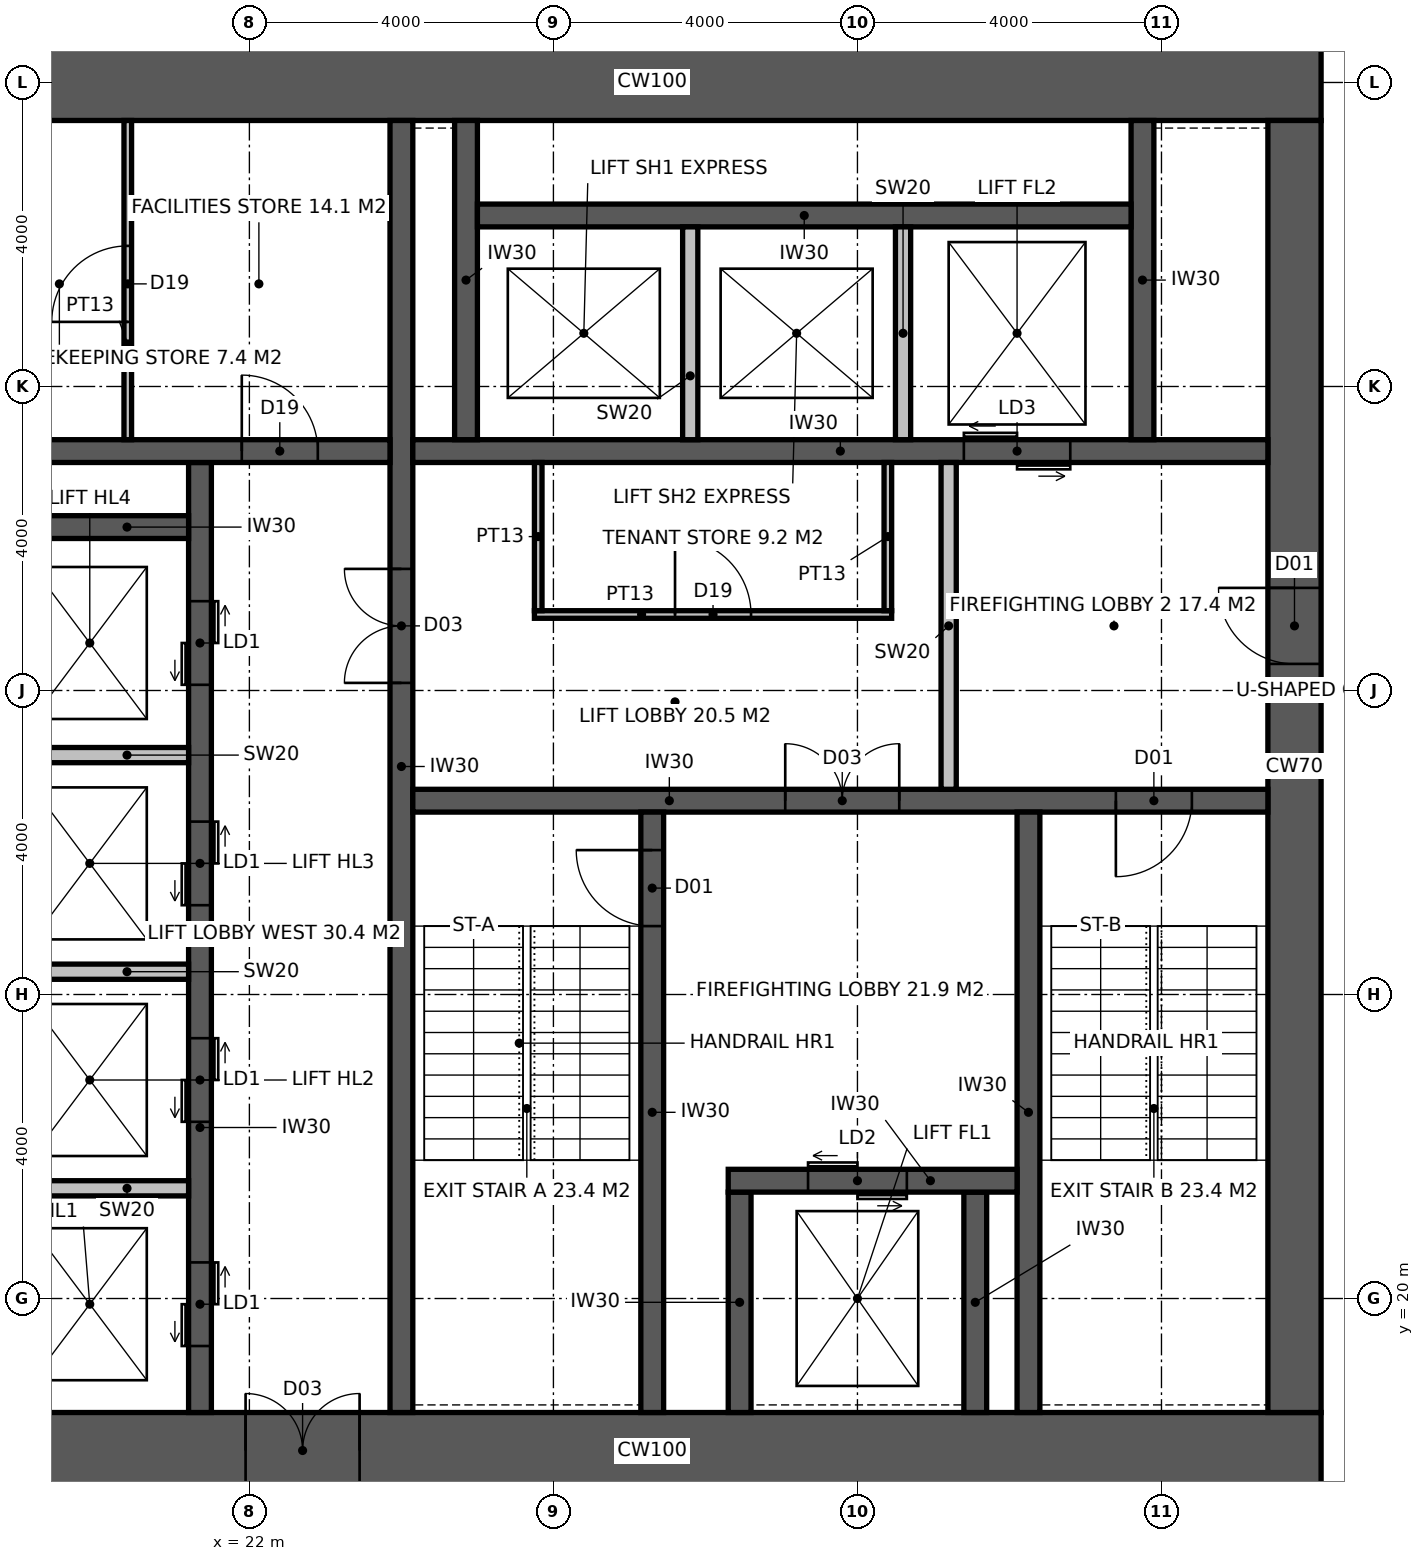
"""IFC4 building model, lengths in metres.
Left out: names, types, materials, properties, quantities, classifications, styles, units other than length and angle.
Written with IfcOpenShell. Run it as: python <this file> out.ifc"""

import sys

from ifc_helpers import new_model, si_unit, direction, frame, frame_2d, origin, place, context, subcontext, project, spatial, rectangle, extrude, element, fill, save


model = new_model("IFC4")
c1 = context("Model", 3, precision=1e-05, world=origin(), true_north=direction((0.0, 1.0)))
c2 = subcontext(c1, "Body", "Model", "MODEL_VIEW")
j1 = project(units=[si_unit("LENGTHUNIT", "METRE"), si_unit("PLANEANGLEUNIT", "RADIAN")], contexts=[c1])
p1 = place(None, origin())
s1 = spatial("IfcSite", under=j1, at=p1, CompositionType="ELEMENT")
p2 = place(p1, origin())
s2 = spatial("IfcBuilding", under=s1, at=p2, CompositionType="ELEMENT")
p3 = place(p2, frame((0.0, 0.0, 187.8)))
s3 = spatial("IfcBuildingStorey", under=s2, at=p3, CompositionType="ELEMENT", Elevation=187.8)
p4 = place(p3, frame((18.5, 18.0, -0.15), z_axis=(0.0, 0.0, 1.0), x_axis=(1.0, 0.0, 0.0)))
e1 = element("IfcWall", 1, at=p4, inside=s3, PredefinedType="SHEAR", context=c2, shape_type="SweptSolid", body=[
    extrude(rectangle(XDim=17.6, YDim=1.0, at=frame_2d((8.8, 0.0))), origin(), (0.0, 0.0, 1.0), 4.0),
])
p5 = place(p4, frame((3.45, 0.0, 0.15)))
e2 = element("IfcOpeningElement", 2, at=p5, cuts=e1, PredefinedType="OPENING", context=c2, shape_type="SweptSolid", body=[
    extrude(rectangle(XDim=1.5, YDim=2.4, at=frame_2d((0.75, 1.2))), frame((0.0, 0.51, 0.0), z_axis=(0.0, -1.0, 0.0), x_axis=(1.0, 0.0, 0.0)), (0.0, 0.0, 1.0), 1.02),
])
p6 = place(p3, frame((18.5, 36.0, -0.15), z_axis=(0.0, 0.0, 1.0), x_axis=(1.0, 0.0, 0.0)))
e3 = element("IfcWall", 3, at=p6, inside=s3, PredefinedType="SHEAR", context=c2, shape_type="SweptSolid", body=[
    extrude(rectangle(XDim=17.6, YDim=1.0, at=frame_2d((8.8, 0.0))), origin(), (0.0, 0.0, 1.0), 4.0),
])
p7 = place(p3, frame((35.75, 18.5, -0.15), z_axis=(0.0, 0.0, 1.0), x_axis=(0.0, 1.0, 0.0)))
e4 = element("IfcWall", 4, at=p7, inside=s3, PredefinedType="SHEAR", context=c2, shape_type="SweptSolid", body=[
    extrude(rectangle(XDim=17.0, YDim=0.7, at=frame_2d((8.5, 0.0))), origin(), (0.0, 0.0, 1.0), 4.0),
])
p8 = place(p7, frame((9.85, 0.0, 0.15)))
e5 = element("IfcOpeningElement", 5, at=p8, cuts=e4, PredefinedType="OPENING", context=c2, shape_type="SweptSolid", body=[
    extrude(rectangle(XDim=1.0, YDim=2.2, at=frame_2d((0.5, 1.1))), frame((0.0, 0.36, 0.0), z_axis=(0.0, -1.0, 0.0), x_axis=(1.0, 0.0, 0.0)), (0.0, 0.0, 1.0), 0.72),
])
p9 = place(p3, frame((24.0, 18.5, -0.15), z_axis=(0.0, 0.0, 1.0), x_axis=(0.0, 1.0, 0.0)))
e6 = element("IfcWall", 6, at=p9, inside=s3, PredefinedType="SHEAR", context=c2, shape_type="SweptSolid", body=[
    extrude(rectangle(XDim=17.0, YDim=0.3, at=frame_2d((8.5, 0.0))), origin(), (0.0, 0.0, 1.0), 4.0),
])
p10 = place(p9, frame((9.6, 0.0, 0.15)))
e7 = element("IfcOpeningElement", 7, at=p10, cuts=e6, PredefinedType="OPENING", context=c2, shape_type="SweptSolid", body=[
    extrude(rectangle(XDim=1.5, YDim=2.4, at=frame_2d((0.75, 1.2))), frame((0.0, 0.16, 0.0), z_axis=(0.0, -1.0, 0.0), x_axis=(1.0, 0.0, 0.0)), (0.0, 0.0, 1.0), 0.32),
])
p11 = place(p3, frame((24.15, 26.55, -0.15), z_axis=(0.0, 0.0, 1.0), x_axis=(1.0, 0.0, 0.0)))
e8 = element("IfcWall", 8, at=p11, inside=s3, PredefinedType="SHEAR", context=c2, shape_type="SweptSolid", body=[
    extrude(rectangle(XDim=11.25, YDim=0.3, at=frame_2d((5.625, 0.0))), origin(), (0.0, 0.0, 1.0), 4.0),
])
p12 = place(p11, frame((9.25, 0.0, 0.15)))
e9 = element("IfcOpeningElement", 9, at=p12, cuts=e8, PredefinedType="OPENING", context=c2, shape_type="SweptSolid", body=[
    extrude(rectangle(XDim=1.0, YDim=2.2, at=frame_2d((0.5, 1.1))), frame((0.0, 0.16, 0.0), z_axis=(0.0, -1.0, 0.0), x_axis=(1.0, 0.0, 0.0)), (0.0, 0.0, 1.0), 0.32),
])
p13 = place(p11, frame((4.9, 0.0, 0.15)))
e10 = element("IfcOpeningElement", 10, at=p13, cuts=e8, PredefinedType="OPENING", context=c2, shape_type="SweptSolid", body=[
    extrude(rectangle(XDim=1.5, YDim=2.4, at=frame_2d((0.75, 1.2))), frame((0.0, 0.16, 0.0), z_axis=(0.0, -1.0, 0.0), x_axis=(1.0, 0.0, 0.0)), (0.0, 0.0, 1.0), 0.32),
])
p14 = place(p3, frame((27.3, 18.5, -0.15), z_axis=(0.0, 0.0, 1.0), x_axis=(0.0, 1.0, 0.0)))
e11 = element("IfcWall", 11, at=p14, inside=s3, PredefinedType="SHEAR", context=c2, shape_type="SweptSolid", body=[
    extrude(rectangle(XDim=7.9, YDim=0.3, at=frame_2d((3.95, 0.0))), origin(), (0.0, 0.0, 1.0), 4.0),
])
p15 = place(p14, frame((6.4, 0.0, 0.15)))
e12 = element("IfcOpeningElement", 12, at=p15, cuts=e11, PredefinedType="OPENING", context=c2, shape_type="SweptSolid", body=[
    extrude(rectangle(XDim=1.0, YDim=2.2, at=frame_2d((0.5, 1.1))), frame((0.0, 0.16, 0.0), z_axis=(0.0, -1.0, 0.0), x_axis=(1.0, 0.0, 0.0)), (0.0, 0.0, 1.0), 0.32),
])
p16 = place(p3, frame((32.25, 18.5, -0.15), z_axis=(0.0, 0.0, 1.0), x_axis=(0.0, 1.0, 0.0)))
e13 = element("IfcWall", 13, at=p16, inside=s3, PredefinedType="SHEAR", context=c2, shape_type="SweptSolid", body=[
    extrude(rectangle(XDim=7.9, YDim=0.3, at=frame_2d((3.95, 0.0))), origin(), (0.0, 0.0, 1.0), 4.0),
])
for number, where, z_axis, x_axis in (
    (14, (28.45, 18.5, -0.15), (0.0, 0.0, 1.0), (0.0, 1.0, 0.0)),
    (15, (31.55, 18.5, -0.15), (0.0, 0.0, 1.0), (0.0, 1.0, 0.0)),
):
    element("IfcWall", number, at=place(p3, frame(where, z_axis=z_axis, x_axis=x_axis)), inside=s3, PredefinedType="SHEAR", context=c2, shape_type="SweptSolid", body=[
        extrude(rectangle(XDim=2.9, YDim=0.3, at=frame_2d((1.45, 0.0))), origin(), (0.0, 0.0, 1.0), 4.0),
    ])
p17 = place(p3, frame((28.3, 21.55, -0.15), z_axis=(0.0, 0.0, 1.0), x_axis=(1.0, 0.0, 0.0)))
e16 = element("IfcWall", 16, at=p17, inside=s3, PredefinedType="SHEAR", context=c2, shape_type="SweptSolid", body=[
    extrude(rectangle(XDim=3.8, YDim=0.3, at=frame_2d((1.9, 0.0))), origin(), (0.0, 0.0, 1.0), 4.0),
])
p18 = place(p17, frame((1.05, 0.0, 0.15)))
e17 = element("IfcOpeningElement", 17, at=p18, cuts=e16, PredefinedType="OPENING", context=c2, shape_type="SweptSolid", body=[
    extrude(rectangle(XDim=1.3, YDim=2.4, at=frame_2d((0.65, 1.2))), frame((0.0, 0.16, 0.0), z_axis=(0.0, -1.0, 0.0), x_axis=(1.0, 0.0, 0.0)), (0.0, 0.0, 1.0), 0.32),
])
p19 = place(p3, frame((24.15, 31.15, -0.15), z_axis=(0.0, 0.0, 1.0), x_axis=(1.0, 0.0, 0.0)))
e18 = element("IfcWall", 18, at=p19, inside=s3, PredefinedType="SHEAR", context=c2, shape_type="SweptSolid", body=[
    extrude(rectangle(XDim=11.25, YDim=0.3, at=frame_2d((5.625, 0.0))), origin(), (0.0, 0.0, 1.0), 4.0),
])
p20 = place(p19, frame((7.25, 0.0, 0.15)))
e19 = element("IfcOpeningElement", 19, at=p20, cuts=e18, PredefinedType="OPENING", context=c2, shape_type="SweptSolid", body=[
    extrude(rectangle(XDim=1.4, YDim=2.4, at=frame_2d((0.7, 1.2))), frame((0.0, 0.16, 0.0), z_axis=(0.0, -1.0, 0.0), x_axis=(1.0, 0.0, 0.0)), (0.0, 0.0, 1.0), 0.32),
])
p21 = place(p3, frame((21.35, 18.5, -0.15), z_axis=(0.0, 0.0, 1.0), x_axis=(0.0, 1.0, 0.0)))
e20 = element("IfcWall", 20, at=p21, inside=s3, PredefinedType="SHEAR", context=c2, shape_type="SweptSolid", body=[
    extrude(rectangle(XDim=12.5, YDim=0.3, at=frame_2d((6.25, 0.0))), origin(), (0.0, 0.0, 1.0), 4.0),
])
p22 = place(p21, frame((0.875, 0.0, 0.15)))
e21 = element("IfcOpeningElement", 21, at=p22, cuts=e20, PredefinedType="OPENING", context=c2, shape_type="SweptSolid", body=[
    extrude(rectangle(XDim=1.1, YDim=2.2, at=frame_2d((0.55, 1.1))), frame((0.0, 0.16, 0.0), z_axis=(0.0, -1.0, 0.0), x_axis=(1.0, 0.0, 0.0)), (0.0, 0.0, 1.0), 0.32),
])
p23 = place(p21, frame((3.825, 0.0, 0.15)))
e22 = element("IfcOpeningElement", 22, at=p23, cuts=e20, PredefinedType="OPENING", context=c2, shape_type="SweptSolid", body=[
    extrude(rectangle(XDim=1.1, YDim=2.2, at=frame_2d((0.55, 1.1))), frame((0.0, 0.16, 0.0), z_axis=(0.0, -1.0, 0.0), x_axis=(1.0, 0.0, 0.0)), (0.0, 0.0, 1.0), 0.32),
])
p24 = place(p21, frame((6.675, 0.0, 0.15)))
e23 = element("IfcOpeningElement", 23, at=p24, cuts=e20, PredefinedType="OPENING", context=c2, shape_type="SweptSolid", body=[
    extrude(rectangle(XDim=1.1, YDim=2.2, at=frame_2d((0.55, 1.1))), frame((0.0, 0.16, 0.0), z_axis=(0.0, -1.0, 0.0), x_axis=(1.0, 0.0, 0.0)), (0.0, 0.0, 1.0), 0.32),
])
p25 = place(p21, frame((9.575, 0.0, 0.15)))
e24 = element("IfcOpeningElement", 24, at=p25, cuts=e20, PredefinedType="OPENING", context=c2, shape_type="SweptSolid", body=[
    extrude(rectangle(XDim=1.1, YDim=2.2, at=frame_2d((0.55, 1.1))), frame((0.0, 0.16, 0.0), z_axis=(0.0, -1.0, 0.0), x_axis=(1.0, 0.0, 0.0)), (0.0, 0.0, 1.0), 0.32),
])
p26 = place(p3, frame((18.5, 31.15, -0.15), z_axis=(0.0, 0.0, 1.0), x_axis=(1.0, 0.0, 0.0)))
e25 = element("IfcWall", 25, at=p26, inside=s3, PredefinedType="SHEAR", context=c2, shape_type="SweptSolid", body=[
    extrude(rectangle(XDim=5.35, YDim=0.3, at=frame_2d((2.675, 0.0))), origin(), (0.0, 0.0, 1.0), 4.0),
])
p27 = place(p26, frame((3.4, 0.0, 0.15)))
e26 = element("IfcOpeningElement", 26, at=p27, cuts=e25, PredefinedType="OPENING", context=c2, shape_type="SweptSolid", body=[
    extrude(rectangle(XDim=1.0, YDim=2.2, at=frame_2d((0.5, 1.1))), frame((0.0, 0.16, 0.0), z_axis=(0.0, -1.0, 0.0), x_axis=(1.0, 0.0, 0.0)), (0.0, 0.0, 1.0), 0.32),
])
p28 = place(p3, frame((18.5, 30.15, -0.15), z_axis=(0.0, 0.0, 1.0), x_axis=(1.0, 0.0, 0.0)))
e27 = element("IfcWall", 27, at=p28, inside=s3, PredefinedType="SHEAR", context=c2, shape_type="SweptSolid", body=[
    extrude(rectangle(XDim=2.7, YDim=0.3, at=frame_2d((1.35, 0.0))), origin(), (0.0, 0.0, 1.0), 4.0),
])
for number, where, z_axis, x_axis in (
    (28, (24.85, 31.3, -0.15), (0.0, 0.0, 1.0), (0.0, 1.0, 0.0)),
    (29, (33.75, 31.3, -0.15), (0.0, 0.0, 1.0), (0.0, 1.0, 0.0)),
):
    element("IfcWall", number, at=place(p3, frame(where, z_axis=z_axis, x_axis=x_axis)), inside=s3, PredefinedType="SHEAR", context=c2, shape_type="SweptSolid", body=[
        extrude(rectangle(XDim=4.2, YDim=0.3, at=frame_2d((2.1, 0.0))), origin(), (0.0, 0.0, 1.0), 4.0),
    ])
p29 = place(p3, frame((25.0, 34.25, -0.15), z_axis=(0.0, 0.0, 1.0), x_axis=(1.0, 0.0, 0.0)))
e30 = element("IfcWall", 30, at=p29, inside=s3, PredefinedType="SHEAR", context=c2, shape_type="SweptSolid", body=[
    extrude(rectangle(XDim=8.6, YDim=0.3, at=frame_2d((4.3, 0.0))), origin(), (0.0, 0.0, 1.0), 4.0),
])
for number, where, z_axis, x_axis in (
    (31, (27.8, 31.3, -0.15), (0.0, 0.0, 1.0), (0.0, 1.0, 0.0)),
    (32, (30.6, 31.3, -0.15), (0.0, 0.0, 1.0), (0.0, 1.0, 0.0)),
):
    element("IfcWall", number, at=place(p3, frame(where, z_axis=z_axis, x_axis=x_axis)), inside=s3, PredefinedType="SOLIDWALL", context=c2, shape_type="SweptSolid", body=[
        extrude(rectangle(XDim=2.8, YDim=0.2, at=frame_2d((1.4, 0.0))), origin(), (0.0, 0.0, 1.0), 4.0),
    ])
for number, where, z_axis, x_axis in (
    (33, (18.5, 21.45, -0.15), (0.0, 0.0, 1.0), (1.0, 0.0, 0.0)),
    (34, (18.5, 24.3, -0.15), (0.0, 0.0, 1.0), (1.0, 0.0, 0.0)),
    (35, (18.5, 27.15, -0.15), (0.0, 0.0, 1.0), (1.0, 0.0, 0.0)),
):
    element("IfcWall", number, at=place(p3, frame(where, z_axis=z_axis, x_axis=x_axis)), inside=s3, PredefinedType="SOLIDWALL", context=c2, shape_type="SweptSolid", body=[
        extrude(rectangle(XDim=2.7, YDim=0.2, at=frame_2d((1.35, 0.0))), origin(), (0.0, 0.0, 1.0), 4.0),
    ])
p30 = place(p3, frame((31.2, 26.7, 0.0), z_axis=(0.0, 0.0, 1.0), x_axis=(0.0, 1.0, 0.0)))
e36 = element("IfcWall", 36, at=p30, inside=s3, PredefinedType="SOLIDWALL", context=c2, shape_type="SweptSolid", body=[
    extrude(rectangle(XDim=4.3, YDim=0.2, at=frame_2d((2.15, 0.0))), origin(), (0.0, 0.0, 1.0), 3.85),
])
p31 = place(p3, frame((20.4, 31.3, 0.0), z_axis=(0.0, 0.0, 1.0), x_axis=(0.0, 1.0, 0.0)))
e37 = element("IfcWall", 37, at=p31, inside=s3, PredefinedType="PARTITIONING", context=c2, shape_type="SweptSolid", body=[
    extrude(rectangle(XDim=4.2, YDim=0.1, at=frame_2d((2.1, 0.0))), origin(), (0.0, 0.0, 1.0), 3.85),
])
p32 = place(p31, frame((1.55, 0.0, 0.0)))
e38 = element("IfcOpeningElement", 38, at=p32, cuts=e37, PredefinedType="OPENING", context=c2, shape_type="SweptSolid", body=[
    extrude(rectangle(XDim=1.0, YDim=2.2, at=frame_2d((0.5, 1.1))), frame((0.0, 0.06, 0.0), z_axis=(0.0, -1.0, 0.0), x_axis=(1.0, 0.0, 0.0)), (0.0, 0.0, 1.0), 0.12),
])
p33 = place(p3, frame((25.75, 29.0, 0.0), z_axis=(0.0, 0.0, 1.0), x_axis=(1.0, 0.0, 0.0)))
e39 = element("IfcWall", 39, at=p33, inside=s3, PredefinedType="PARTITIONING", context=c2, shape_type="SweptSolid", body=[
    extrude(rectangle(XDim=4.7, YDim=0.1, at=frame_2d((2.35, 0.0))), origin(), (0.0, 0.0, 1.0), 3.85),
])
p34 = place(p33, frame((1.85, 0.0, 0.0)))
e40 = element("IfcOpeningElement", 40, at=p34, cuts=e39, PredefinedType="OPENING", context=c2, shape_type="SweptSolid", body=[
    extrude(rectangle(XDim=1.0, YDim=2.2, at=frame_2d((0.5, 1.1))), frame((0.0, 0.06, 0.0), z_axis=(0.0, -1.0, 0.0), x_axis=(1.0, 0.0, 0.0)), (0.0, 0.0, 1.0), 0.12),
])
for number, where, z_axis, x_axis in (
    (41, (25.8, 29.05, 0.0), (0.0, 0.0, 1.0), (0.0, 1.0, 0.0)),
    (42, (30.4, 29.05, 0.0), (0.0, 0.0, 1.0), (0.0, 1.0, 0.0)),
):
    element("IfcWall", number, at=place(p3, frame(where, z_axis=z_axis, x_axis=x_axis)), inside=s3, PredefinedType="PARTITIONING", context=c2, shape_type="SweptSolid", body=[
        extrude(rectangle(XDim=1.95, YDim=0.1, at=frame_2d((0.975, 0.0))), origin(), (0.0, 0.0, 1.0), 3.85),
    ])
p35 = place(p15, origin())
e43 = element("IfcDoor", 43, at=p35, inside=s3, OperationType="SINGLE_SWING_RIGHT", PredefinedType="DOOR", context=c2, shape_type="SweptSolid", body=[
    extrude(rectangle(XDim=1.0, YDim=2.2, at=frame_2d((0.5, 1.1))), frame((0.0, 0.025, 0.0), z_axis=(0.0, -1.0, 0.0), x_axis=(1.0, 0.0, 0.0)), (0.0, 0.0, 1.0), 0.05),
])
fill(e12, e43)
p36 = place(p12, frame((1.0, 0.0, 0.0), z_axis=(0.0, 0.0, 1.0), x_axis=(-1.0, 0.0, 0.0)))
e44 = element("IfcDoor", 44, at=p36, inside=s3, OperationType="SINGLE_SWING_RIGHT", PredefinedType="DOOR", context=c2, shape_type="SweptSolid", body=[
    extrude(rectangle(XDim=1.0, YDim=2.2, at=frame_2d((0.5, 1.1))), frame((0.0, 0.025, 0.0), z_axis=(0.0, -1.0, 0.0), x_axis=(1.0, 0.0, 0.0)), (0.0, 0.0, 1.0), 0.05),
])
fill(e9, e44)
p37 = place(p8, origin())
e45 = element("IfcDoor", 45, at=p37, inside=s3, OperationType="SINGLE_SWING_RIGHT", PredefinedType="DOOR", context=c2, shape_type="SweptSolid", body=[
    extrude(rectangle(XDim=1.0, YDim=2.2, at=frame_2d((0.5, 1.1))), frame((0.0, 0.025, 0.0), z_axis=(0.0, -1.0, 0.0), x_axis=(1.0, 0.0, 0.0)), (0.0, 0.0, 1.0), 0.05),
])
fill(e5, e45)
p38 = place(p13, origin())
e46 = element("IfcDoor", 46, at=p38, inside=s3, OperationType="DOUBLE_DOOR_DOUBLE_SWING", PredefinedType="DOOR", context=c2, shape_type="SweptSolid", body=[
    extrude(rectangle(XDim=1.5, YDim=2.4, at=frame_2d((0.75, 1.2))), frame((0.0, 0.025, 0.0), z_axis=(0.0, -1.0, 0.0), x_axis=(1.0, 0.0, 0.0)), (0.0, 0.0, 1.0), 0.05),
])
fill(e10, e46)
p39 = place(p10, origin())
e47 = element("IfcDoor", 47, at=p39, inside=s3, OperationType="DOUBLE_DOOR_DOUBLE_SWING", PredefinedType="DOOR", context=c2, shape_type="SweptSolid", body=[
    extrude(rectangle(XDim=1.5, YDim=2.4, at=frame_2d((0.75, 1.2))), frame((0.0, 0.025, 0.0), z_axis=(0.0, -1.0, 0.0), x_axis=(1.0, 0.0, 0.0)), (0.0, 0.0, 1.0), 0.05),
])
fill(e7, e47)
p40 = place(p27, origin())
e48 = element("IfcDoor", 48, at=p40, inside=s3, OperationType="SINGLE_SWING_LEFT", PredefinedType="DOOR", context=c2, shape_type="SweptSolid", body=[
    extrude(rectangle(XDim=1.0, YDim=2.2, at=frame_2d((0.5, 1.1))), frame((0.0, 0.025, 0.0), z_axis=(0.0, -1.0, 0.0), x_axis=(1.0, 0.0, 0.0)), (0.0, 0.0, 1.0), 0.05),
])
fill(e26, e48)
p41 = place(p32, origin())
e49 = element("IfcDoor", 49, at=p41, inside=s3, OperationType="SINGLE_SWING_LEFT", PredefinedType="DOOR", context=c2, shape_type="SweptSolid", body=[
    extrude(rectangle(XDim=1.0, YDim=2.2, at=frame_2d((0.5, 1.1))), frame((0.0, 0.025, 0.0), z_axis=(0.0, -1.0, 0.0), x_axis=(1.0, 0.0, 0.0)), (0.0, 0.0, 1.0), 0.05),
])
fill(e38, e49)
p42 = place(p34, origin())
e50 = element("IfcDoor", 50, at=p42, inside=s3, OperationType="SINGLE_SWING_LEFT", PredefinedType="DOOR", context=c2, shape_type="SweptSolid", body=[
    extrude(rectangle(XDim=1.0, YDim=2.2, at=frame_2d((0.5, 1.1))), frame((0.0, 0.025, 0.0), z_axis=(0.0, -1.0, 0.0), x_axis=(1.0, 0.0, 0.0)), (0.0, 0.0, 1.0), 0.05),
])
fill(e40, e50)
p43 = place(p5, origin())
e51 = element("IfcDoor", 51, at=p43, inside=s3, OperationType="DOUBLE_DOOR_DOUBLE_SWING", PredefinedType="DOOR", context=c2, shape_type="SweptSolid", body=[
    extrude(rectangle(XDim=1.5, YDim=2.4, at=frame_2d((0.75, 1.2))), frame((0.0, 0.025, 0.0), z_axis=(0.0, -1.0, 0.0), x_axis=(1.0, 0.0, 0.0)), (0.0, 0.0, 1.0), 0.05),
])
fill(e2, e51)
p44 = place(p18, origin())
e52 = element("IfcDoor", 52, at=p44, inside=s3, OperationType="DOUBLE_DOOR_SLIDING", PredefinedType="DOOR", context=c2, shape_type="SweptSolid", body=[
    extrude(rectangle(XDim=1.3, YDim=2.4, at=frame_2d((0.65, 1.2))), frame((0.0, 0.025, 0.0), z_axis=(0.0, -1.0, 0.0), x_axis=(1.0, 0.0, 0.0)), (0.0, 0.0, 1.0), 0.05),
])
fill(e17, e52)
p45 = place(p20, origin())
e53 = element("IfcDoor", 53, at=p45, inside=s3, OperationType="DOUBLE_DOOR_SLIDING", PredefinedType="DOOR", context=c2, shape_type="SweptSolid", body=[
    extrude(rectangle(XDim=1.4, YDim=2.4, at=frame_2d((0.7, 1.2))), frame((0.0, 0.025, 0.0), z_axis=(0.0, -1.0, 0.0), x_axis=(1.0, 0.0, 0.0)), (0.0, 0.0, 1.0), 0.05),
])
fill(e19, e53)
p46 = place(p22, origin())
e54 = element("IfcDoor", 54, at=p46, inside=s3, OperationType="DOUBLE_DOOR_SLIDING", PredefinedType="DOOR", context=c2, shape_type="SweptSolid", body=[
    extrude(rectangle(XDim=1.1, YDim=2.2, at=frame_2d((0.55, 1.1))), frame((0.0, 0.025, 0.0), z_axis=(0.0, -1.0, 0.0), x_axis=(1.0, 0.0, 0.0)), (0.0, 0.0, 1.0), 0.05),
])
fill(e21, e54)
p47 = place(p23, origin())
e55 = element("IfcDoor", 55, at=p47, inside=s3, OperationType="DOUBLE_DOOR_SLIDING", PredefinedType="DOOR", context=c2, shape_type="SweptSolid", body=[
    extrude(rectangle(XDim=1.1, YDim=2.2, at=frame_2d((0.55, 1.1))), frame((0.0, 0.025, 0.0), z_axis=(0.0, -1.0, 0.0), x_axis=(1.0, 0.0, 0.0)), (0.0, 0.0, 1.0), 0.05),
])
fill(e22, e55)
p48 = place(p24, origin())
e56 = element("IfcDoor", 56, at=p48, inside=s3, OperationType="DOUBLE_DOOR_SLIDING", PredefinedType="DOOR", context=c2, shape_type="SweptSolid", body=[
    extrude(rectangle(XDim=1.1, YDim=2.2, at=frame_2d((0.55, 1.1))), frame((0.0, 0.025, 0.0), z_axis=(0.0, -1.0, 0.0), x_axis=(1.0, 0.0, 0.0)), (0.0, 0.0, 1.0), 0.05),
])
fill(e23, e56)
p49 = place(p25, origin())
e57 = element("IfcDoor", 57, at=p49, inside=s3, OperationType="DOUBLE_DOOR_SLIDING", PredefinedType="DOOR", context=c2, shape_type="SweptSolid", body=[
    extrude(rectangle(XDim=1.1, YDim=2.2, at=frame_2d((0.55, 1.1))), frame((0.0, 0.025, 0.0), z_axis=(0.0, -1.0, 0.0), x_axis=(1.0, 0.0, 0.0)), (0.0, 0.0, 1.0), 0.05),
])
fill(e24, e57)
save(model, sys.argv[1])
